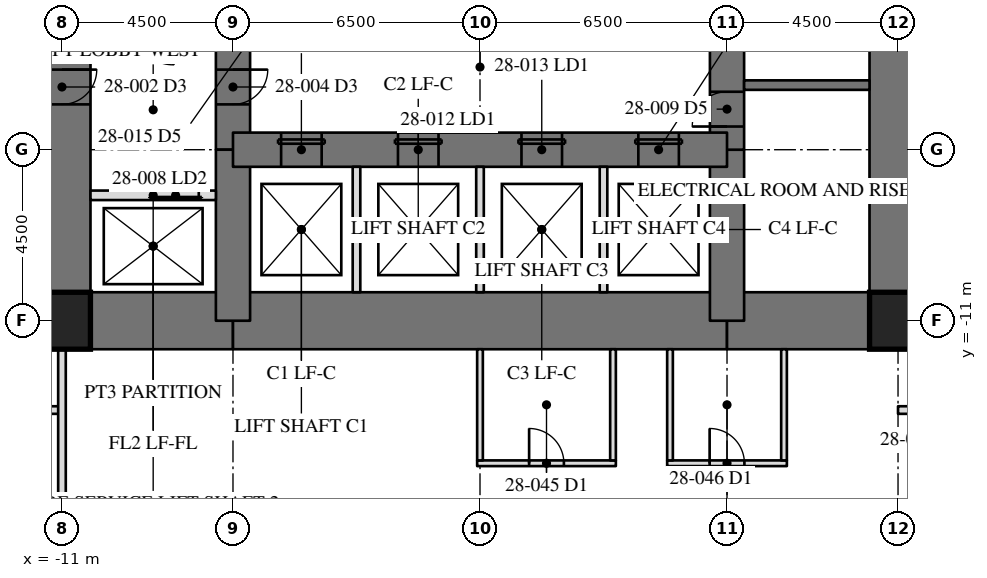
"""IFC4 building model, lengths in metres.
Left out: names, types, materials, properties, quantities, classifications, styles, units other than length and angle.
Written with IfcOpenShell. Run it as: python <this file> out.ifc"""

import sys

from ifc_helpers import new_model, si_unit, direction, frame, frame_2d, origin, origin_2d, place, context, subcontext, project, spatial, rectangle, hollow_rectangle, extrude, element, fill, save


model = new_model("IFC4")
c1 = context("Model", 3, precision=1e-05, world=origin(), true_north=direction((0.0, 1.0)))
c2 = subcontext(c1, "Body", "Model", "MODEL_VIEW")
j1 = project(units=[si_unit("LENGTHUNIT", "METRE"), si_unit("PLANEANGLEUNIT", "RADIAN")], contexts=[c1])
p1 = place(None, origin())
s1 = spatial("IfcSite", under=j1, at=p1, CompositionType="ELEMENT")
p2 = place(p1, origin())
s2 = spatial("IfcBuilding", under=s1, at=p2, CompositionType="ELEMENT")
p3 = place(p2, frame((0.0, 0.0, 121.3)))
s3 = spatial("IfcBuildingStorey", under=s2, at=p3, CompositionType="ELEMENT", Elevation=121.3)
p4 = place(p3, frame((11.0, -11.0, 0.0), z_axis=(0.0, 0.0, 1.0), x_axis=(0.0, 1.0, 0.0)))
e1 = element("IfcWall", 1, at=p4, inside=s3, PredefinedType="SHEAR", context=c2, shape_type="SweptSolid", body=[
    extrude(rectangle(XDim=22.0, YDim=1.5, at=frame_2d((11.0, 0.0))), origin(), (0.0, 0.0, 1.0), 4.1),
])
p5 = place(p4, frame((15.393, 0.0, 0.0)))
e2 = element("IfcOpeningElement", 2, at=p5, cuts=e1, PredefinedType="OPENING", context=c2, shape_type="SweptSolid", body=[
    extrude(rectangle(XDim=0.915, YDim=2.134, at=frame_2d((0.458, 1.067))), frame((0.0, 0.76, 0.0), z_axis=(0.0, -1.0, 0.0), x_axis=(1.0, 0.0, 0.0)), (0.0, 0.0, 1.0), 1.52),
])
p6 = place(p3, frame((-11.0, 11.0, 0.0), z_axis=(0.0, 0.0, 1.0), x_axis=(0.0, -1.0, 0.0)))
e3 = element("IfcWall", 3, at=p6, inside=s3, PredefinedType="SHEAR", context=c2, shape_type="SweptSolid", body=[
    extrude(rectangle(XDim=22.0, YDim=1.5, at=frame_2d((11.0, 0.0))), origin(), (0.0, 0.0, 1.0), 4.1),
])
p7 = place(p6, frame((15.393, 0.0, 0.0)))
e4 = element("IfcOpeningElement", 4, at=p7, cuts=e3, PredefinedType="OPENING", context=c2, shape_type="SweptSolid", body=[
    extrude(rectangle(XDim=0.915, YDim=2.134, at=frame_2d((0.458, 1.067))), frame((0.0, 0.76, 0.0), z_axis=(0.0, -1.0, 0.0), x_axis=(1.0, 0.0, 0.0)), (0.0, 0.0, 1.0), 1.52),
])
p8 = place(p3, frame((-11.0, -11.0, 0.0), z_axis=(0.0, 0.0, 1.0), x_axis=(1.0, 0.0, 0.0)))
e5 = element("IfcWall", 5, at=p8, inside=s3, PredefinedType="SHEAR", context=c2, shape_type="SweptSolid", body=[
    extrude(rectangle(XDim=4.5, YDim=1.5, at=frame_2d((2.25, 0.0))), origin(), (0.0, 0.0, 1.0), 4.1),
])
p9 = place(p3, frame((-6.5, -11.0, 0.0), z_axis=(0.0, 0.0, 1.0), x_axis=(1.0, 0.0, 0.0)))
e6 = element("IfcWall", 6, at=p9, inside=s3, PredefinedType="SHEAR", context=c2, shape_type="SweptSolid", body=[
    extrude(rectangle(XDim=13.0, YDim=1.5, at=frame_2d((6.5, 0.0))), origin(), (0.0, 0.0, 1.0), 4.1),
])
p10 = place(p3, frame((6.5, -11.0, 0.0), z_axis=(0.0, 0.0, 1.0), x_axis=(1.0, 0.0, 0.0)))
e7 = element("IfcWall", 7, at=p10, inside=s3, PredefinedType="SHEAR", context=c2, shape_type="SweptSolid", body=[
    extrude(rectangle(XDim=4.5, YDim=1.5, at=frame_2d((2.25, 0.0))), origin(), (0.0, 0.0, 1.0), 4.1),
])
p11 = place(p3, frame((6.5, -11.0, 0.0), z_axis=(0.0, 0.0, 1.0), x_axis=(0.0, 1.0, 0.0)))
e8 = element("IfcWall", 8, at=p11, inside=s3, PredefinedType="SHEAR", context=c2, shape_type="SweptSolid", body=[
    extrude(rectangle(XDim=4.5, YDim=0.9, at=frame_2d((2.25, 0.0))), origin(), (0.0, 0.0, 1.0), 4.1),
])
p12 = place(p3, frame((6.5, -6.5, 0.0), z_axis=(0.0, 0.0, 1.0), x_axis=(0.0, 1.0, 0.0)))
e9 = element("IfcWall", 9, at=p12, inside=s3, PredefinedType="SHEAR", context=c2, shape_type="SweptSolid", body=[
    extrude(rectangle(XDim=13.0, YDim=0.9, at=frame_2d((6.5, 0.0))), origin(), (0.0, 0.0, 1.0), 4.1),
])
p13 = place(p12, frame((10.893, 0.0, 0.0)))
e10 = element("IfcOpeningElement", 10, at=p13, cuts=e9, PredefinedType="OPENING", context=c2, shape_type="SweptSolid", body=[
    extrude(rectangle(XDim=0.915, YDim=2.134, at=frame_2d((0.458, 1.067))), frame((0.0, 0.46, 0.0), z_axis=(0.0, -1.0, 0.0), x_axis=(1.0, 0.0, 0.0)), (0.0, 0.0, 1.0), 0.92),
])
p14 = place(p12, frame((0.61, 0.0, 0.0)))
e11 = element("IfcOpeningElement", 11, at=p14, cuts=e9, PredefinedType="OPENING", context=c2, shape_type="SweptSolid", body=[
    extrude(rectangle(XDim=0.915, YDim=2.134, at=frame_2d((0.458, 1.067))), frame((0.0, 0.46, 0.0), z_axis=(0.0, -1.0, 0.0), x_axis=(1.0, 0.0, 0.0)), (0.0, 0.0, 1.0), 0.92),
])
p15 = place(p3, frame((-6.5, 6.5, 0.0), z_axis=(0.0, 0.0, 1.0), x_axis=(0.0, -1.0, 0.0)))
e12 = element("IfcWall", 12, at=p15, inside=s3, PredefinedType="SHEAR", context=c2, shape_type="SweptSolid", body=[
    extrude(rectangle(XDim=13.0, YDim=0.9, at=frame_2d((6.5, 0.0))), origin(), (0.0, 0.0, 1.0), 4.1),
])
p16 = place(p15, frame((10.893, 0.0, 0.0)))
e13 = element("IfcOpeningElement", 13, at=p16, cuts=e12, PredefinedType="OPENING", context=c2, shape_type="SweptSolid", body=[
    extrude(rectangle(XDim=0.915, YDim=2.134, at=frame_2d((0.458, 1.067))), frame((0.0, 0.46, 0.0), z_axis=(0.0, -1.0, 0.0), x_axis=(1.0, 0.0, 0.0)), (0.0, 0.0, 1.0), 0.92),
])
p17 = place(p15, frame((0.61, 0.0, 0.0)))
e14 = element("IfcOpeningElement", 14, at=p17, cuts=e12, PredefinedType="OPENING", context=c2, shape_type="SweptSolid", body=[
    extrude(rectangle(XDim=0.915, YDim=2.134, at=frame_2d((0.458, 1.067))), frame((0.0, 0.46, 0.0), z_axis=(0.0, -1.0, 0.0), x_axis=(1.0, 0.0, 0.0)), (0.0, 0.0, 1.0), 0.92),
])
p18 = place(p3, frame((-6.5, -6.5, 0.0), z_axis=(0.0, 0.0, 1.0), x_axis=(0.0, -1.0, 0.0)))
e15 = element("IfcWall", 15, at=p18, inside=s3, PredefinedType="SHEAR", context=c2, shape_type="SweptSolid", body=[
    extrude(rectangle(XDim=4.5, YDim=0.9, at=frame_2d((2.25, 0.0))), origin(), (0.0, 0.0, 1.0), 4.1),
])
p19 = place(p3, frame((-6.5, -6.5, 0.0), z_axis=(0.0, 0.0, 1.0), x_axis=(1.0, 0.0, 0.0)))
e16 = element("IfcWall", 16, at=p19, inside=s3, PredefinedType="SHEAR", context=c2, shape_type="SweptSolid", body=[
    extrude(rectangle(XDim=13.0, YDim=0.9, at=frame_2d((6.5, 0.0))), origin(), (0.0, 0.0, 1.0), 4.1),
])
p20 = place(p19, frame((1.267, 0.0, 0.0)))
e17 = element("IfcOpeningElement", 17, at=p20, cuts=e16, PredefinedType="OPENING", context=c2, shape_type="SweptSolid", body=[
    extrude(rectangle(XDim=1.067, YDim=2.134, at=frame_2d((0.533, 1.067))), frame((0.0, 0.46, 0.0), z_axis=(0.0, -1.0, 0.0), x_axis=(1.0, 0.0, 0.0)), (0.0, 0.0, 1.0), 0.92),
])
p21 = place(p19, frame((4.342, 0.0, 0.0)))
e18 = element("IfcOpeningElement", 18, at=p21, cuts=e16, PredefinedType="OPENING", context=c2, shape_type="SweptSolid", body=[
    extrude(rectangle(XDim=1.067, YDim=2.134, at=frame_2d((0.533, 1.067))), frame((0.0, 0.46, 0.0), z_axis=(0.0, -1.0, 0.0), x_axis=(1.0, 0.0, 0.0)), (0.0, 0.0, 1.0), 0.92),
])
p22 = place(p19, frame((7.592, 0.0, 0.0)))
e19 = element("IfcOpeningElement", 19, at=p22, cuts=e16, PredefinedType="OPENING", context=c2, shape_type="SweptSolid", body=[
    extrude(rectangle(XDim=1.067, YDim=2.134, at=frame_2d((0.533, 1.067))), frame((0.0, 0.46, 0.0), z_axis=(0.0, -1.0, 0.0), x_axis=(1.0, 0.0, 0.0)), (0.0, 0.0, 1.0), 0.92),
])
p23 = place(p19, frame((10.667, 0.0, 0.0)))
e20 = element("IfcOpeningElement", 20, at=p23, cuts=e16, PredefinedType="OPENING", context=c2, shape_type="SweptSolid", body=[
    extrude(rectangle(XDim=1.067, YDim=2.134, at=frame_2d((0.533, 1.067))), frame((0.0, 0.46, 0.0), z_axis=(0.0, -1.0, 0.0), x_axis=(1.0, 0.0, 0.0)), (0.0, 0.0, 1.0), 0.92),
])
for number, where, z_axis, x_axis in (
    (21, (-11.0, -11.0, 0.0), (0.0, 0.0, 1.0), (1.0, 0.0, 0.0)),
    (22, (11.0, -11.0, 0.0), (0.0, 0.0, 1.0), (1.0, 0.0, 0.0)),
):
    element("IfcColumn", number, at=place(p3, frame(where, z_axis=z_axis, x_axis=x_axis)), inside=s3, PredefinedType="COLUMN", context=c2, shape_type="SweptSolid", body=[
        extrude(hollow_rectangle(XDim=1.499, YDim=1.499, WallThickness=0.102, at=origin_2d()), origin(), (0.0, 0.0, 1.0), 4.1),
    ])
p24 = place(p3, frame((6.95, -4.8, 0.0), z_axis=(0.0, 0.0, 1.0), x_axis=(1.0, 0.0, 0.0)))
e23 = element("IfcWall", 23, at=p24, inside=s3, PredefinedType="SOLIDWALL", context=c2, shape_type="SweptSolid", body=[
    extrude(rectangle(XDim=3.3, YDim=0.25, at=frame_2d((1.65, 0.0))), origin(), (0.0, 0.0, 1.0), 3.91),
])
p25 = place(p3, frame((-6.95, -7.7, 0.0), z_axis=(0.0, 0.0, 1.0), x_axis=(-1.0, 0.0, 0.0)))
e24 = element("IfcWall", 24, at=p25, inside=s3, PredefinedType="PARTITIONING", context=c2, shape_type="SweptSolid", body=[
    extrude(rectangle(XDim=3.3, YDim=0.25, at=frame_2d((1.65, 0.0))), origin(), (0.0, 0.0, 1.0), 3.91),
])
p26 = place(p25, frame((0.45, 0.0, 0.0)))
e25 = element("IfcOpeningElement", 25, at=p26, cuts=e24, PredefinedType="OPENING", context=c2, shape_type="SweptSolid", body=[
    extrude(rectangle(XDim=1.219, YDim=2.134, at=frame_2d((0.609, 1.067))), frame((0.0, 0.135, 0.0), z_axis=(0.0, -1.0, 0.0), x_axis=(1.0, 0.0, 0.0)), (0.0, 0.0, 1.0), 0.27),
])
for number, where, z_axis, x_axis in (
    (26, (-3.25, -10.25, 0.0), (0.0, 0.0, 1.0), (0.0, 1.0, 0.0)),
    (27, (0.0, -10.25, 0.0), (0.0, 0.0, 1.0), (0.0, 1.0, 0.0)),
    (28, (3.25, -10.25, 0.0), (0.0, 0.0, 1.0), (0.0, 1.0, 0.0)),
):
    element("IfcWall", number, at=place(p3, frame(where, z_axis=z_axis, x_axis=x_axis)), inside=s3, PredefinedType="PARTITIONING", context=c2, shape_type="SweptSolid", body=[
        extrude(rectangle(XDim=3.3, YDim=0.2, at=frame_2d((1.65, 0.0))), origin(), (0.0, 0.0, 1.0), 3.91),
    ])
for number, where, z_axis, x_axis in (
    (29, (11.0, -13.35, 0.0), (0.0, 0.0, 1.0), (1.0, 0.0, 0.0)),
    (30, (-11.0, -13.35, 0.0), (0.0, 0.0, 1.0), (-1.0, 0.0, 0.0)),
):
    element("IfcWall", number, at=place(p3, frame(where, z_axis=z_axis, x_axis=x_axis)), inside=s3, PredefinedType="PARTITIONING", context=c2, shape_type="SweptSolid", body=[
        extrude(rectangle(XDim=2.45, YDim=0.2, at=frame_2d((1.225, 0.0))), origin(), (0.0, 0.0, 1.0), 3.91),
    ])
p27 = place(p3, frame((-11.0, -11.75, 0.0), z_axis=(0.0, 0.0, 1.0), x_axis=(0.0, -1.0, 0.0)))
e31 = element("IfcWall", 31, at=p27, inside=s3, PredefinedType="PARTITIONING", context=c2, shape_type="SweptSolid", body=[
    extrude(rectangle(XDim=10.665, YDim=0.2, at=frame_2d((5.333, 0.0))), origin(), (0.0, 0.0, 1.0), 3.326),
])
p28 = place(p3, frame((-0.075, -14.75, 0.0), z_axis=(0.0, 0.0, 1.0), x_axis=(1.0, 0.0, 0.0)))
e32 = element("IfcWall", 32, at=p28, inside=s3, PredefinedType="PARTITIONING", context=c2, shape_type="SweptSolid", body=[
    extrude(rectangle(XDim=3.65, YDim=0.15, at=frame_2d((1.825, 0.0))), origin(), (0.0, 0.0, 1.0), 3.91),
])
p29 = place(p28, frame((1.367, 0.0, 0.0)))
e33 = element("IfcOpeningElement", 33, at=p29, cuts=e32, PredefinedType="OPENING", context=c2, shape_type="SweptSolid", body=[
    extrude(rectangle(XDim=0.915, YDim=2.134, at=frame_2d((0.458, 1.067))), frame((0.0, 0.085, 0.0), z_axis=(0.0, -1.0, 0.0), x_axis=(1.0, 0.0, 0.0)), (0.0, 0.0, 1.0), 0.17),
])
p30 = place(p3, frame((0.0, -14.675, 0.0), z_axis=(0.0, 0.0, 1.0), x_axis=(0.0, 1.0, 0.0)))
e34 = element("IfcWall", 34, at=p30, inside=s3, PredefinedType="PARTITIONING", context=c2, shape_type="SweptSolid", body=[
    extrude(rectangle(XDim=2.925, YDim=0.15, at=frame_2d((1.462, 0.0))), origin(), (0.0, 0.0, 1.0), 3.326),
])
p31 = place(p3, frame((3.5, -14.675, 0.0), z_axis=(0.0, 0.0, 1.0), x_axis=(0.0, 1.0, 0.0)))
e35 = element("IfcWall", 35, at=p31, inside=s3, PredefinedType="PARTITIONING", context=c2, shape_type="SweptSolid", body=[
    extrude(rectangle(XDim=2.925, YDim=0.15, at=frame_2d((1.462, 0.0))), origin(), (0.0, 0.0, 1.0), 3.91),
])
p32 = place(p3, frame((4.925, -14.75, 0.0), z_axis=(0.0, 0.0, 1.0), x_axis=(1.0, 0.0, 0.0)))
e36 = element("IfcWall", 36, at=p32, inside=s3, PredefinedType="PARTITIONING", context=c2, shape_type="SweptSolid", body=[
    extrude(rectangle(XDim=3.15, YDim=0.15, at=frame_2d((1.575, 0.0))), origin(), (0.0, 0.0, 1.0), 3.91),
])
p33 = place(p32, frame((1.117, 0.0, 0.0)))
e37 = element("IfcOpeningElement", 37, at=p33, cuts=e36, PredefinedType="OPENING", context=c2, shape_type="SweptSolid", body=[
    extrude(rectangle(XDim=0.915, YDim=2.134, at=frame_2d((0.458, 1.067))), frame((0.0, 0.085, 0.0), z_axis=(0.0, -1.0, 0.0), x_axis=(1.0, 0.0, 0.0)), (0.0, 0.0, 1.0), 0.17),
])
for number, where, z_axis, x_axis in (
    (38, (5.0, -14.675, 0.0), (0.0, 0.0, 1.0), (0.0, 1.0, 0.0)),
    (39, (8.0, -14.675, 0.0), (0.0, 0.0, 1.0), (0.0, 1.0, 0.0)),
):
    element("IfcWall", number, at=place(p3, frame(where, z_axis=z_axis, x_axis=x_axis)), inside=s3, PredefinedType="PARTITIONING", context=c2, shape_type="SweptSolid", body=[
        extrude(rectangle(XDim=2.925, YDim=0.15, at=frame_2d((1.462, 0.0))), origin(), (0.0, 0.0, 1.0), 3.91),
    ])
p34 = place(p16, origin())
e40 = element("IfcDoor", 40, at=p34, inside=s3, OperationType="SINGLE_SWING_RIGHT", PredefinedType="DOOR", context=c2, shape_type="SweptSolid", body=[
    extrude(rectangle(XDim=0.915, YDim=2.134, at=frame_2d((0.458, 1.067))), frame((0.0, -0.375, 0.0), z_axis=(0.0, -1.0, 0.0), x_axis=(1.0, 0.0, 0.0)), (0.0, 0.0, 1.0), 0.05),
])
fill(e13, e40)
p35 = place(p26, origin())
e41 = element("IfcDoor", 41, at=p35, inside=s3, OperationType="SLIDING_TO_LEFT", PredefinedType="DOOR", context=c2, shape_type="SweptSolid", body=[
    extrude(rectangle(XDim=1.219, YDim=2.134, at=frame_2d((0.609, 1.067))), frame((0.0, 0.025, 0.0), z_axis=(0.0, -1.0, 0.0), x_axis=(1.0, 0.0, 0.0)), (0.0, 0.0, 1.0), 0.05),
])
fill(e25, e41)
p36 = place(p14, origin())
e42 = element("IfcDoor", 42, at=p36, inside=s3, OperationType="SINGLE_SWING_RIGHT", PredefinedType="DOOR", context=c2, shape_type="SweptSolid", body=[
    extrude(rectangle(XDim=0.915, YDim=2.134, at=frame_2d((0.458, 1.067))), frame((0.0, -0.375, 0.0), z_axis=(0.0, -1.0, 0.0), x_axis=(1.0, 0.0, 0.0)), (0.0, 0.0, 1.0), 0.05),
])
fill(e11, e42)
p37 = place(p20, origin())
e43 = element("IfcDoor", 43, at=p37, inside=s3, OperationType="SLIDING_TO_LEFT", PredefinedType="DOOR", context=c2, shape_type="SweptSolid", body=[
    extrude(rectangle(XDim=1.067, YDim=2.134, at=frame_2d((0.533, 1.067))), frame((0.0, -0.375, 0.0), z_axis=(0.0, -1.0, 0.0), x_axis=(1.0, 0.0, 0.0)), (0.0, 0.0, 1.0), 0.05),
])
fill(e17, e43)
p38 = place(p21, origin())
e44 = element("IfcDoor", 44, at=p38, inside=s3, OperationType="SLIDING_TO_LEFT", PredefinedType="DOOR", context=c2, shape_type="SweptSolid", body=[
    extrude(rectangle(XDim=1.067, YDim=2.134, at=frame_2d((0.533, 1.067))), frame((0.0, -0.375, 0.0), z_axis=(0.0, -1.0, 0.0), x_axis=(1.0, 0.0, 0.0)), (0.0, 0.0, 1.0), 0.05),
])
fill(e18, e44)
p39 = place(p22, origin())
e45 = element("IfcDoor", 45, at=p39, inside=s3, OperationType="SLIDING_TO_LEFT", PredefinedType="DOOR", context=c2, shape_type="SweptSolid", body=[
    extrude(rectangle(XDim=1.067, YDim=2.134, at=frame_2d((0.533, 1.067))), frame((0.0, -0.375, 0.0), z_axis=(0.0, -1.0, 0.0), x_axis=(1.0, 0.0, 0.0)), (0.0, 0.0, 1.0), 0.05),
])
fill(e19, e45)
p40 = place(p23, origin())
e46 = element("IfcDoor", 46, at=p40, inside=s3, OperationType="SLIDING_TO_LEFT", PredefinedType="DOOR", context=c2, shape_type="SweptSolid", body=[
    extrude(rectangle(XDim=1.067, YDim=2.134, at=frame_2d((0.533, 1.067))), frame((0.0, -0.375, 0.0), z_axis=(0.0, -1.0, 0.0), x_axis=(1.0, 0.0, 0.0)), (0.0, 0.0, 1.0), 0.05),
])
fill(e20, e46)
p41 = place(p29, origin())
e47 = element("IfcDoor", 47, at=p41, inside=s3, OperationType="SINGLE_SWING_LEFT", PredefinedType="DOOR", context=c2, shape_type="SweptSolid", body=[
    extrude(rectangle(XDim=0.915, YDim=2.134, at=frame_2d((0.458, 1.067))), frame((0.0, 0.025, 0.0), z_axis=(0.0, -1.0, 0.0), x_axis=(1.0, 0.0, 0.0)), (0.0, 0.0, 1.0), 0.05),
])
fill(e33, e47)
p42 = place(p33, origin())
e48 = element("IfcDoor", 48, at=p42, inside=s3, OperationType="SINGLE_SWING_LEFT", PredefinedType="DOOR", context=c2, shape_type="SweptSolid", body=[
    extrude(rectangle(XDim=0.915, YDim=2.134, at=frame_2d((0.458, 1.067))), frame((0.0, 0.025, 0.0), z_axis=(0.0, -1.0, 0.0), x_axis=(1.0, 0.0, 0.0)), (0.0, 0.0, 1.0), 0.05),
])
fill(e37, e48)
save(model, sys.argv[1])
